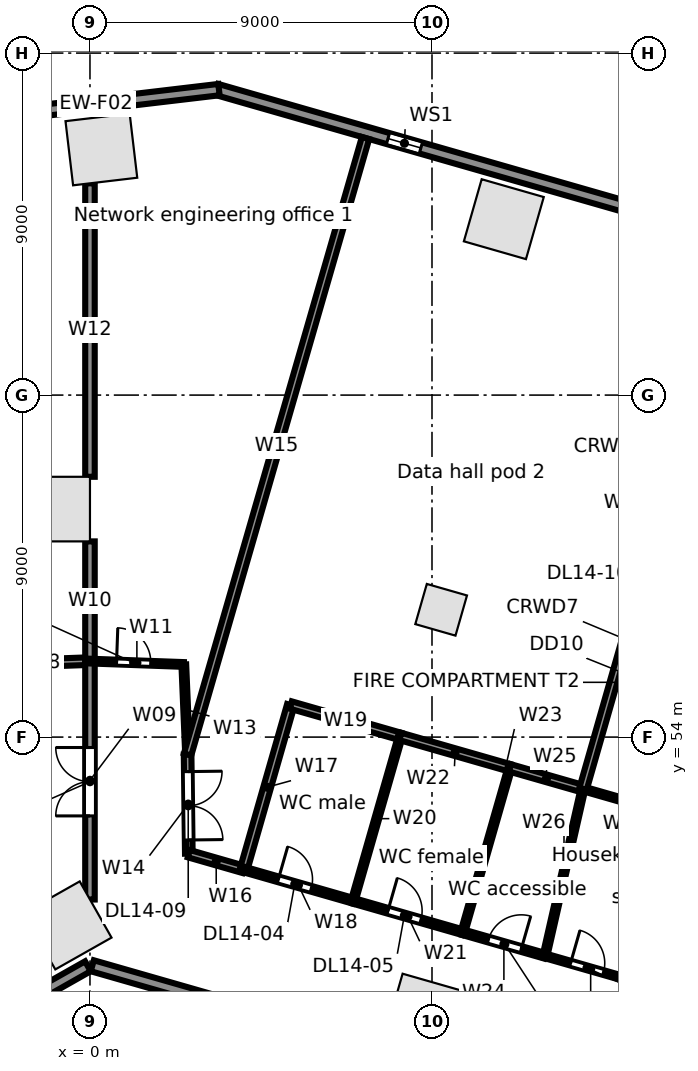
"""IFC4 building model, lengths in metres.
Left out: names, types, materials, properties, quantities, classifications, styles, units other than length and angle.
Written with IfcOpenShell. Run it as: python <this file> out.ifc"""

import sys

from ifc_helpers import new_model, si_unit, direction, frame, frame_2d, origin, origin_2d, place, context, subcontext, project, spatial, rectangle, extrude, element, fill, save


model = new_model("IFC4")
c1 = context("Model", 3, precision=1e-05, world=origin(), true_north=direction((0.0, 1.0)))
c2 = subcontext(c1, "Body", "Model", "MODEL_VIEW")
j1 = project(units=[si_unit("LENGTHUNIT", "METRE"), si_unit("PLANEANGLEUNIT", "RADIAN")], contexts=[c1])
p1 = place(None, origin())
s1 = spatial("IfcSite", under=j1, at=p1, CompositionType="ELEMENT")
p2 = place(p1, origin())
s2 = spatial("IfcBuilding", under=s1, at=p2, CompositionType="ELEMENT")
p3 = place(p2, frame((0.0, 0.0, 71.5)))
s3 = spatial("IfcBuildingStorey", under=s2, at=p3, CompositionType="ELEMENT", Elevation=71.5)
for number, where, z_axis, x_axis in (
    (1, (10.89, 67.629, 0.0), (0.0, 0.0, 1.0), (-0.961, 0.276, 0.0)),
    (2, (0.3, 69.464, 0.0), (0.0, 0.0, 1.0), (-0.993, -0.118, 0.0)),
    (3, (-0.591, 49.044, 0.0), (0.0, 0.0, 1.0), (0.87, 0.492, 0.0)),
    (4, (8.81, 46.722, 0.0), (0.0, 0.0, 1.0), (0.961, -0.276, 0.0)),
    (5, (-0.85, 60.0, 0.0), (0.0, 0.0, 1.0), (0.0, 1.0, 0.0)),
):
    element("IfcColumn", number, at=place(p3, frame(where, z_axis=z_axis, x_axis=x_axis)), inside=s3, PredefinedType="COLUMN", context=c2, shape_type="SweptSolid", body=[
        extrude(rectangle(XDim=1.7, YDim=1.7, at=origin_2d()), origin(), (0.0, 0.0, 1.0), 5.0),
    ])
p4 = place(p3, frame((9.241, 57.35, 0.0), z_axis=(0.0, 0.0, 1.0), x_axis=(0.961261695938, -0.275637355817, 0.0)))
e6 = element("IfcColumn", 6, at=p4, inside=s3, PredefinedType="COLUMN", context=c2, shape_type="SweptSolid", body=[
    extrude(rectangle(XDim=1.1, YDim=1.1, at=origin_2d()), origin(), (0.0, 0.0, 1.0), 5.0),
])
p5 = place(p3, frame((3.335, 71.044, 0.0), z_axis=(0.0, 0.0, 1.0), x_axis=(0.961260130989, -0.275642813387, 0.0)))
e7 = element("IfcWall", 7, at=p5, inside=s3, PredefinedType="STANDARD", context=c2, shape_type="SweptSolid", body=[
    extrude(rectangle(XDim=32.741, YDim=0.3, at=frame_2d((16.371, 0.0))), origin(), (0.0, 0.0, 1.0), 4.68),
])
p6 = place(p5, frame((29.207, 0.0, 0.6)))
e8 = element("IfcOpeningElement", 8, at=p6, cuts=e7, PredefinedType="OPENING", context=c2, shape_type="SweptSolid", body=[
    extrude(rectangle(XDim=0.9, YDim=3.2, at=frame_2d((0.45, 1.6))), frame((0.0, 0.16, 0.0), z_axis=(0.0, -1.0, 0.0), x_axis=(1.0, 0.0, 0.0)), (0.0, 0.0, 1.0), 0.32),
])
p7 = place(p5, frame((21.034, 0.0, 0.6)))
e9 = element("IfcOpeningElement", 9, at=p7, cuts=e7, PredefinedType="OPENING", context=c2, shape_type="SweptSolid", body=[
    extrude(rectangle(XDim=0.9, YDim=3.2, at=frame_2d((0.45, 1.6))), frame((0.0, 0.16, 0.0), z_axis=(0.0, -1.0, 0.0), x_axis=(1.0, 0.0, 0.0)), (0.0, 0.0, 1.0), 0.32),
])
p8 = place(p5, frame((12.861, 0.0, 0.6)))
e10 = element("IfcOpeningElement", 10, at=p8, cuts=e7, PredefinedType="OPENING", context=c2, shape_type="SweptSolid", body=[
    extrude(rectangle(XDim=0.9, YDim=3.2, at=frame_2d((0.45, 1.6))), frame((0.0, 0.16, 0.0), z_axis=(0.0, -1.0, 0.0), x_axis=(1.0, 0.0, 0.0)), (0.0, 0.0, 1.0), 0.32),
])
p9 = place(p5, frame((4.688, 0.0, 0.6)))
e11 = element("IfcOpeningElement", 11, at=p9, cuts=e7, PredefinedType="OPENING", context=c2, shape_type="SweptSolid", body=[
    extrude(rectangle(XDim=0.9, YDim=3.2, at=frame_2d((0.45, 1.6))), frame((0.0, 0.16, 0.0), z_axis=(0.0, -1.0, 0.0), x_axis=(1.0, 0.0, 0.0)), (0.0, 0.0, 1.0), 0.32),
])
p10 = place(p3, frame((-3.076, 70.273, 0.0), z_axis=(0.0, 0.0, 1.0), x_axis=(0.993067743007, 0.117543429416, 0.0)))
e12 = element("IfcWall", 12, at=p10, inside=s3, PredefinedType="STANDARD", context=c2, shape_type="SweptSolid", body=[
    extrude(rectangle(XDim=6.516, YDim=0.3, at=frame_2d((3.258, 0.0))), origin(), (0.0, 0.0, 1.0), 4.68),
])
p11 = place(p3, frame((-0.055, 47.969, 0.0), z_axis=(0.0, 0.0, 1.0), x_axis=(-0.870355730478, -0.492423499058, 0.0)))
e13 = element("IfcWall", 13, at=p11, inside=s3, PredefinedType="STANDARD", context=c2, shape_type="SweptSolid", body=[
    extrude(rectangle(XDim=43.75, YDim=0.3, at=frame_2d((21.875, 0.0))), origin(), (0.0, 0.0, 1.0), 4.68),
])
p12 = place(p11, frame((39.977, 0.0, 0.6)))
e14 = element("IfcOpeningElement", 14, at=p12, cuts=e13, PredefinedType="OPENING", context=c2, shape_type="SweptSolid", body=[
    extrude(rectangle(XDim=0.9, YDim=3.2, at=frame_2d((0.45, 1.6))), frame((0.0, 0.16, 0.0), z_axis=(0.0, -1.0, 0.0), x_axis=(1.0, 0.0, 0.0)), (0.0, 0.0, 1.0), 0.32),
])
p13 = place(p11, frame((31.222, 0.0, 0.6)))
e15 = element("IfcOpeningElement", 15, at=p13, cuts=e13, PredefinedType="OPENING", context=c2, shape_type="SweptSolid", body=[
    extrude(rectangle(XDim=0.9, YDim=3.2, at=frame_2d((0.45, 1.6))), frame((0.0, 0.16, 0.0), z_axis=(0.0, -1.0, 0.0), x_axis=(1.0, 0.0, 0.0)), (0.0, 0.0, 1.0), 0.32),
])
p14 = place(p11, frame((22.468, 0.0, 0.6)))
e16 = element("IfcOpeningElement", 16, at=p14, cuts=e13, PredefinedType="OPENING", context=c2, shape_type="SweptSolid", body=[
    extrude(rectangle(XDim=0.9, YDim=3.2, at=frame_2d((0.45, 1.6))), frame((0.0, 0.16, 0.0), z_axis=(0.0, -1.0, 0.0), x_axis=(1.0, 0.0, 0.0)), (0.0, 0.0, 1.0), 0.32),
])
p15 = place(p11, frame((13.713, 0.0, 0.6)))
e17 = element("IfcOpeningElement", 17, at=p15, cuts=e13, PredefinedType="OPENING", context=c2, shape_type="SweptSolid", body=[
    extrude(rectangle(XDim=0.9, YDim=3.2, at=frame_2d((0.45, 1.6))), frame((0.0, 0.16, 0.0), z_axis=(0.0, -1.0, 0.0), x_axis=(1.0, 0.0, 0.0)), (0.0, 0.0, 1.0), 0.32),
])
p16 = place(p11, frame((4.959, 0.0, 0.6)))
e18 = element("IfcOpeningElement", 18, at=p16, cuts=e13, PredefinedType="OPENING", context=c2, shape_type="SweptSolid", body=[
    extrude(rectangle(XDim=0.9, YDim=3.2, at=frame_2d((0.45, 1.6))), frame((0.0, 0.16, 0.0), z_axis=(0.0, -1.0, 0.0), x_axis=(1.0, 0.0, 0.0)), (0.0, 0.0, 1.0), 0.32),
])
p17 = place(p3, frame((25.398, 40.717, 0.0), z_axis=(0.0, 0.0, 1.0), x_axis=(-0.961262423262, 0.275634819324, 0.0)))
e19 = element("IfcWall", 19, at=p17, inside=s3, PredefinedType="STANDARD", context=c2, shape_type="SweptSolid", body=[
    extrude(rectangle(XDim=26.359, YDim=0.3, at=frame_2d((13.179, 0.0))), origin(), (0.0, 0.0, 1.0), 4.68),
])
p18 = place(p17, frame((22.664, 0.0, 0.6)))
e20 = element("IfcOpeningElement", 20, at=p18, cuts=e19, PredefinedType="OPENING", context=c2, shape_type="SweptSolid", body=[
    extrude(rectangle(XDim=0.9, YDim=3.2, at=frame_2d((0.45, 1.6))), frame((0.0, 0.16, 0.0), z_axis=(0.0, -1.0, 0.0), x_axis=(1.0, 0.0, 0.0)), (0.0, 0.0, 1.0), 0.32),
])
p19 = place(p17, frame((13.844, 0.0, 0.6)))
e21 = element("IfcOpeningElement", 21, at=p19, cuts=e19, PredefinedType="OPENING", context=c2, shape_type="SweptSolid", body=[
    extrude(rectangle(XDim=0.9, YDim=3.2, at=frame_2d((0.45, 1.6))), frame((0.0, 0.16, 0.0), z_axis=(0.0, -1.0, 0.0), x_axis=(1.0, 0.0, 0.0)), (0.0, 0.0, 1.0), 0.32),
])
p20 = place(p17, frame((5.023, 0.0, 0.6)))
e22 = element("IfcOpeningElement", 22, at=p20, cuts=e19, PredefinedType="OPENING", context=c2, shape_type="SweptSolid", body=[
    extrude(rectangle(XDim=0.9, YDim=3.2, at=frame_2d((0.45, 1.6))), frame((0.0, 0.16, 0.0), z_axis=(0.0, -1.0, 0.0), x_axis=(1.0, 0.0, 0.0)), (0.0, 0.0, 1.0), 0.32),
])
p21 = place(p3, frame((-2.67, 55.904, 0.0), z_axis=(0.0, 0.0, 1.0), x_axis=(0.999354913865, 0.03591317494, 0.0)))
e23 = element("IfcWall", 23, at=p21, inside=s3, PredefinedType="PARTITIONING", context=c2, shape_type="SweptSolid", body=[
    extrude(rectangle(XDim=2.672, YDim=0.2, at=frame_2d((1.336, 0.0))), origin(), (0.0, 0.0, 1.0), 3.742),
])
p22 = place(p3, frame((0.0, 49.726, 0.0), z_axis=(0.0, 0.0, 1.0), x_axis=(0.0, 1.0, 0.0)))
e24 = element("IfcWall", 24, at=p22, inside=s3, PredefinedType="PARTITIONING", context=c2, shape_type="SweptSolid", body=[
    extrude(rectangle(XDim=6.274, YDim=0.25, at=frame_2d((3.137, 0.0))), origin(), (0.0, 0.0, 1.0), 4.68),
])
p23 = place(p22, frame((2.2, 0.0, 0.0)))
e25 = element("IfcOpeningElement", 25, at=p23, cuts=e24, PredefinedType="OPENING", context=c2, shape_type="SweptSolid", body=[
    extrude(rectangle(XDim=1.8, YDim=2.1, at=frame_2d((0.9, 1.05))), frame((0.0, 0.135, 0.0), z_axis=(0.0, -1.0, 0.0), x_axis=(1.0, 0.0, 0.0)), (0.0, 0.0, 1.0), 0.27),
])
p24 = place(p3, frame((0.0, 56.0, 0.0), z_axis=(0.0, 0.0, 1.0), x_axis=(0.0, 1.0, 0.0)))
e26 = element("IfcWall", 26, at=p24, inside=s3, PredefinedType="PARTITIONING", context=c2, shape_type="SweptSolid", body=[
    extrude(rectangle(XDim=3.15, YDim=0.25, at=frame_2d((1.575, 0.0))), origin(), (0.0, 0.0, 1.0), 4.68),
])
p25 = place(p3, frame((0.0, 56.0, 0.0), z_axis=(0.0, 0.0, 1.0), x_axis=(0.999349313684, -0.036068673934, 0.0)))
e27 = element("IfcWall", 27, at=p25, inside=s3, PredefinedType="PARTITIONING", context=c2, shape_type="SweptSolid", body=[
    extrude(rectangle(XDim=2.471, YDim=0.125, at=frame_2d((1.235, 0.0))), origin(), (0.0, 0.0, 1.0), 4.68),
])
p26 = place(p25, frame((0.7, 0.0, 0.0)))
e28 = element("IfcOpeningElement", 28, at=p26, cuts=e27, PredefinedType="OPENING", context=c2, shape_type="SweptSolid", body=[
    extrude(rectangle(XDim=0.9, YDim=2.1, at=frame_2d((0.45, 1.05))), frame((0.0, 0.073, 0.0), z_axis=(0.0, -1.0, 0.0), x_axis=(1.0, 0.0, 0.0)), (0.0, 0.0, 1.0), 0.145),
])
p27 = place(p3, frame((0.0, 60.85, 0.0), z_axis=(0.0, 0.0, 1.0), x_axis=(0.0, 1.0, 0.0)))
e29 = element("IfcWall", 29, at=p27, inside=s3, PredefinedType="PARTITIONING", context=c2, shape_type="SweptSolid", body=[
    extrude(rectangle(XDim=7.723, YDim=0.25, at=frame_2d((3.861, 0.0))), origin(), (0.0, 0.0, 1.0), 3.952),
])
p28 = place(p3, frame((2.469, 55.911, 0.0), z_axis=(0.0, 0.0, 1.0), x_axis=(0.042217300367, -0.999108452346, 0.0)))
e30 = element("IfcWall", 30, at=p28, inside=s3, PredefinedType="PARTITIONING", context=c2, shape_type="SweptSolid", body=[
    extrude(rectangle(XDim=2.371, YDim=0.125, at=frame_2d((1.186, 0.0))), origin(), (0.0, 0.0, 1.0), 4.68),
])
p29 = place(p3, frame((2.569, 53.542, 0.0), z_axis=(0.0, 0.0, 1.0), x_axis=(0.012252377394, -0.999924936807, 0.0)))
e31 = element("IfcWall", 31, at=p29, inside=s3, PredefinedType="PARTITIONING", context=c2, shape_type="SweptSolid", body=[
    extrude(rectangle(XDim=2.61, YDim=0.2, at=frame_2d((1.305, 0.0))), origin(), (0.0, 0.0, 1.0), 4.68),
])
p30 = place(p29, frame((0.45, 0.0, 0.0)))
e32 = element("IfcOpeningElement", 32, at=p30, cuts=e31, PredefinedType="OPENING", context=c2, shape_type="SweptSolid", body=[
    extrude(rectangle(XDim=1.8, YDim=2.1, at=frame_2d((0.9, 1.05))), frame((0.0, 0.11, 0.0), z_axis=(0.0, -1.0, 0.0), x_axis=(1.0, 0.0, 0.0)), (0.0, 0.0, 1.0), 0.22),
])
p31 = place(p3, frame((2.569, 53.542, 0.0), z_axis=(0.0, 0.0, 1.0), x_axis=(0.277281040764, 0.960788855281, 0.0)))
e33 = element("IfcWall", 33, at=p31, inside=s3, PredefinedType="PARTITIONING", context=c2, shape_type="SweptSolid", body=[
    extrude(rectangle(XDim=16.885, YDim=0.2, at=frame_2d((8.442, 0.0))), origin(), (0.0, 0.0, 1.0), 3.742),
])
p32 = place(p3, frame((2.601, 50.932, 0.0), z_axis=(0.0, 0.0, 1.0), x_axis=(0.961197773994, -0.27586018065, 0.0)))
e34 = element("IfcWall", 34, at=p32, inside=s3, PredefinedType="PARTITIONING", context=c2, shape_type="SweptSolid", body=[
    extrude(rectangle(XDim=1.5, YDim=0.2, at=frame_2d((0.75, 0.0))), origin(), (0.0, 0.0, 1.0), 4.68),
])
p33 = place(p3, frame((4.043, 50.518, 0.0), z_axis=(0.0, 0.0, 1.0), x_axis=(0.275745553681, 0.96123066411, 0.0)))
e35 = element("IfcWall", 35, at=p33, inside=s3, PredefinedType="PARTITIONING", context=c2, shape_type="SweptSolid", body=[
    extrude(rectangle(XDim=4.5, YDim=0.2, at=frame_2d((2.25, 0.0))), origin(), (0.0, 0.0, 1.0), 4.68),
])
p34 = place(p3, frame((4.043, 50.518, 0.0), z_axis=(0.0, 0.0, 1.0), x_axis=(0.961247103494, -0.275688240636, 0.0)))
e36 = element("IfcWall", 36, at=p34, inside=s3, PredefinedType="PARTITIONING", context=c2, shape_type="SweptSolid", body=[
    extrude(rectangle(XDim=3.0, YDim=0.15, at=frame_2d((1.5, 0.0))), origin(), (0.0, 0.0, 1.0), 4.68),
])
p35 = place(p34, frame((0.95, 0.0, 0.0)))
e37 = element("IfcOpeningElement", 37, at=p35, cuts=e36, PredefinedType="OPENING", context=c2, shape_type="SweptSolid", body=[
    extrude(rectangle(XDim=0.9, YDim=2.1, at=frame_2d((0.45, 1.05))), frame((0.0, 0.085, 0.0), z_axis=(0.0, -1.0, 0.0), x_axis=(1.0, 0.0, 0.0)), (0.0, 0.0, 1.0), 0.17),
])
p36 = place(p3, frame((5.284, 54.844, 0.0), z_axis=(0.0, 0.0, 1.0), x_axis=(0.961243927922, -0.275699312717, 0.0)))
e38 = element("IfcWall", 38, at=p36, inside=s3, PredefinedType="PARTITIONING", context=c2, shape_type="SweptSolid", body=[
    extrude(rectangle(XDim=2.999, YDim=0.2, at=frame_2d((1.5, 0.0))), origin(), (0.0, 0.0, 1.0), 4.68),
])
p37 = place(p3, frame((6.927, 49.691, 0.0), z_axis=(0.0, 0.0, 1.0), x_axis=(0.275530671241, 0.961292280841, 0.0)))
e39 = element("IfcWall", 39, at=p37, inside=s3, PredefinedType="PARTITIONING", context=c2, shape_type="SweptSolid", body=[
    extrude(rectangle(XDim=4.5, YDim=0.125, at=frame_2d((2.25, 0.0))), origin(), (0.0, 0.0, 1.0), 4.68),
])
p38 = place(p3, frame((6.927, 49.691, 0.0), z_axis=(0.0, 0.0, 1.0), x_axis=(0.961268664977, -0.27561305073, 0.0)))
e40 = element("IfcWall", 40, at=p38, inside=s3, PredefinedType="PARTITIONING", context=c2, shape_type="SweptSolid", body=[
    extrude(rectangle(XDim=3.0, YDim=0.15, at=frame_2d((1.5, 0.0))), origin(), (0.0, 0.0, 1.0), 3.742),
])
p39 = place(p38, frame((0.95, 0.0, 0.0)))
e41 = element("IfcOpeningElement", 41, at=p39, cuts=e40, PredefinedType="OPENING", context=c2, shape_type="SweptSolid", body=[
    extrude(rectangle(XDim=0.9, YDim=2.1, at=frame_2d((0.45, 1.05))), frame((0.0, 0.085, 0.0), z_axis=(0.0, -1.0, 0.0), x_axis=(1.0, 0.0, 0.0)), (0.0, 0.0, 1.0), 0.17),
])
p40 = place(p3, frame((8.167, 54.017, 0.0), z_axis=(0.0, 0.0, 1.0), x_axis=(0.961247103494, -0.275688240636, 0.0)))
e42 = element("IfcWall", 42, at=p40, inside=s3, PredefinedType="PARTITIONING", context=c2, shape_type="SweptSolid", body=[
    extrude(rectangle(XDim=3.0, YDim=0.2, at=frame_2d((1.5, 0.0))), origin(), (0.0, 0.0, 1.0), 3.742),
])
p41 = place(p3, frame((9.811, 48.864, 0.0), z_axis=(0.0, 0.0, 1.0), x_axis=(0.275545040649, 0.96128816209, 0.0)))
e43 = element("IfcWall", 43, at=p41, inside=s3, PredefinedType="PARTITIONING", context=c2, shape_type="SweptSolid", body=[
    extrude(rectangle(XDim=4.5, YDim=0.125, at=frame_2d((2.25, 0.0))), origin(), (0.0, 0.0, 1.0), 4.68),
])
p42 = place(p3, frame((9.811, 48.864, 0.0), z_axis=(0.0, 0.0, 1.0), x_axis=(0.961236680145, -0.275724581318, 0.0)))
e44 = element("IfcWall", 44, at=p42, inside=s3, PredefinedType="PARTITIONING", context=c2, shape_type="SweptSolid", body=[
    extrude(rectangle(XDim=2.249, YDim=0.15, at=frame_2d((1.125, 0.0))), origin(), (0.0, 0.0, 1.0), 4.68),
])
p43 = place(p42, frame((0.7, 0.0, 0.0)))
e45 = element("IfcOpeningElement", 45, at=p43, cuts=e44, PredefinedType="OPENING", context=c2, shape_type="SweptSolid", body=[
    extrude(rectangle(XDim=0.9, YDim=2.1, at=frame_2d((0.45, 1.05))), frame((0.0, 0.085, 0.0), z_axis=(0.0, -1.0, 0.0), x_axis=(1.0, 0.0, 0.0)), (0.0, 0.0, 1.0), 0.17),
])
p44 = place(p3, frame((11.051, 53.19, 0.0), z_axis=(0.0, 0.0, 1.0), x_axis=(0.961316434736, -0.275446387355, 0.0)))
e46 = element("IfcWall", 46, at=p44, inside=s3, PredefinedType="PARTITIONING", context=c2, shape_type="SweptSolid", body=[
    extrude(rectangle(XDim=2.0, YDim=0.2, at=frame_2d((1.0, 0.0))), origin(), (0.0, 0.0, 1.0), 4.68),
])
p45 = place(p3, frame((11.973, 48.244, 0.0), z_axis=(0.0, 0.0, 1.0), x_axis=(0.222117362571, 0.975019936845, 0.0)))
e47 = element("IfcWall", 47, at=p45, inside=s3, PredefinedType="PARTITIONING", context=c2, shape_type="SweptSolid", body=[
    extrude(rectangle(XDim=4.508, YDim=0.125, at=frame_2d((2.254, 0.0))), origin(), (0.0, 0.0, 1.0), 4.68),
])
p46 = place(p3, frame((11.973, 48.244, 0.0), z_axis=(0.0, 0.0, 1.0), x_axis=(0.961302601161, -0.275494662382, 0.0)))
e48 = element("IfcWall", 48, at=p46, inside=s3, PredefinedType="PARTITIONING", context=c2, shape_type="SweptSolid", body=[
    extrude(rectangle(XDim=2.501, YDim=0.125, at=frame_2d((1.25, 0.0))), origin(), (0.0, 0.0, 1.0), 4.68),
])
p47 = place(p46, frame((0.7, 0.0, 0.0)))
e49 = element("IfcOpeningElement", 49, at=p47, cuts=e48, PredefinedType="OPENING", context=c2, shape_type="SweptSolid", body=[
    extrude(rectangle(XDim=0.9, YDim=2.1, at=frame_2d((0.45, 1.05))), frame((0.0, 0.073, 0.0), z_axis=(0.0, -1.0, 0.0), x_axis=(1.0, 0.0, 0.0)), (0.0, 0.0, 1.0), 0.145),
])
p48 = place(p3, frame((12.974, 52.639, 0.0), z_axis=(0.0, 0.0, 1.0), x_axis=(0.961262138292, -0.275635813142, 0.0)))
e50 = element("IfcWall", 50, at=p48, inside=s3, PredefinedType="PARTITIONING", context=c2, shape_type="SweptSolid", body=[
    extrude(rectangle(XDim=2.749, YDim=0.125, at=frame_2d((1.375, 0.0))), origin(), (0.0, 0.0, 1.0), 4.68),
])
p49 = place(p3, frame((12.974, 52.639, 0.0), z_axis=(0.0, 0.0, 1.0), x_axis=(0.275299463768, 0.961358520662, 0.0)))
e51 = element("IfcWall", 51, at=p49, inside=s3, PredefinedType="PARTITIONING", context=c2, shape_type="SweptSolid", body=[
    extrude(rectangle(XDim=14.885, YDim=0.2, at=frame_2d((7.443, 0.0))), origin(), (0.0, 0.0, 1.0), 3.742),
])
p50 = place(p9, origin())
e52 = element("IfcWindow", 52, at=p50, inside=s3, PartitioningType="SINGLE_PANEL", PredefinedType="WINDOW", context=c2, shape_type="SweptSolid", body=[
    extrude(rectangle(XDim=0.9, YDim=3.2, at=frame_2d((0.45, 1.6))), frame((0.0, 0.03, 0.0), z_axis=(0.0, -1.0, 0.0), x_axis=(1.0, 0.0, 0.0)), (0.0, 0.0, 1.0), 0.06),
])
fill(e11, e52)
p51 = place(p35, origin())
e53 = element("IfcDoor", 53, at=p51, inside=s3, OperationType="SINGLE_SWING_LEFT", PredefinedType="DOOR", context=c2, shape_type="SweptSolid", body=[
    extrude(rectangle(XDim=0.9, YDim=2.1, at=frame_2d((0.45, 1.05))), frame((0.0, 0.025, 0.0), z_axis=(0.0, -1.0, 0.0), x_axis=(1.0, 0.0, 0.0)), (0.0, 0.0, 1.0), 0.05),
])
fill(e37, e53)
p52 = place(p39, origin())
e54 = element("IfcDoor", 54, at=p52, inside=s3, OperationType="SINGLE_SWING_LEFT", PredefinedType="DOOR", context=c2, shape_type="SweptSolid", body=[
    extrude(rectangle(XDim=0.9, YDim=2.1, at=frame_2d((0.45, 1.05))), frame((0.0, 0.025, 0.0), z_axis=(0.0, -1.0, 0.0), x_axis=(1.0, 0.0, 0.0)), (0.0, 0.0, 1.0), 0.05),
])
fill(e41, e54)
p53 = place(p43, origin())
e55 = element("IfcDoor", 55, at=p53, inside=s3, OperationType="SINGLE_SWING_RIGHT", PredefinedType="DOOR", context=c2, shape_type="SweptSolid", body=[
    extrude(rectangle(XDim=0.9, YDim=2.1, at=frame_2d((0.45, 1.05))), frame((0.0, 0.025, 0.0), z_axis=(0.0, -1.0, 0.0), x_axis=(1.0, 0.0, 0.0)), (0.0, 0.0, 1.0), 0.05),
])
fill(e45, e55)
p54 = place(p47, origin())
e56 = element("IfcDoor", 56, at=p54, inside=s3, OperationType="SINGLE_SWING_LEFT", PredefinedType="DOOR", context=c2, shape_type="SweptSolid", body=[
    extrude(rectangle(XDim=0.9, YDim=2.1, at=frame_2d((0.45, 1.05))), frame((0.0, 0.025, 0.0), z_axis=(0.0, -1.0, 0.0), x_axis=(1.0, 0.0, 0.0)), (0.0, 0.0, 1.0), 0.05),
])
fill(e49, e56)
p55 = place(p26, origin())
e57 = element("IfcDoor", 57, at=p55, inside=s3, OperationType="SINGLE_SWING_LEFT", PredefinedType="DOOR", context=c2, shape_type="SweptSolid", body=[
    extrude(rectangle(XDim=0.9, YDim=2.1, at=frame_2d((0.45, 1.05))), frame((0.0, 0.025, 0.0), z_axis=(0.0, -1.0, 0.0), x_axis=(1.0, 0.0, 0.0)), (0.0, 0.0, 1.0), 0.05),
])
fill(e28, e57)
p56 = place(p30, origin())
e58 = element("IfcDoor", 58, at=p56, inside=s3, OperationType="DOUBLE_DOOR_SINGLE_SWING", PredefinedType="DOOR", context=c2, shape_type="SweptSolid", body=[
    extrude(rectangle(XDim=1.8, YDim=2.1, at=frame_2d((0.9, 1.05))), frame((0.0, 0.025, 0.0), z_axis=(0.0, -1.0, 0.0), x_axis=(1.0, 0.0, 0.0)), (0.0, 0.0, 1.0), 0.05),
])
fill(e32, e58)
p57 = place(p23, origin())
e59 = element("IfcDoor", 59, at=p57, inside=s3, OperationType="DOUBLE_DOOR_SINGLE_SWING", PredefinedType="DOOR", context=c2, shape_type="SweptSolid", body=[
    extrude(rectangle(XDim=1.8, YDim=2.1, at=frame_2d((0.9, 1.05))), frame((0.0, 0.025, 0.0), z_axis=(0.0, -1.0, 0.0), x_axis=(1.0, 0.0, 0.0)), (0.0, 0.0, 1.0), 0.05),
])
fill(e25, e59)
save(model, sys.argv[1])
